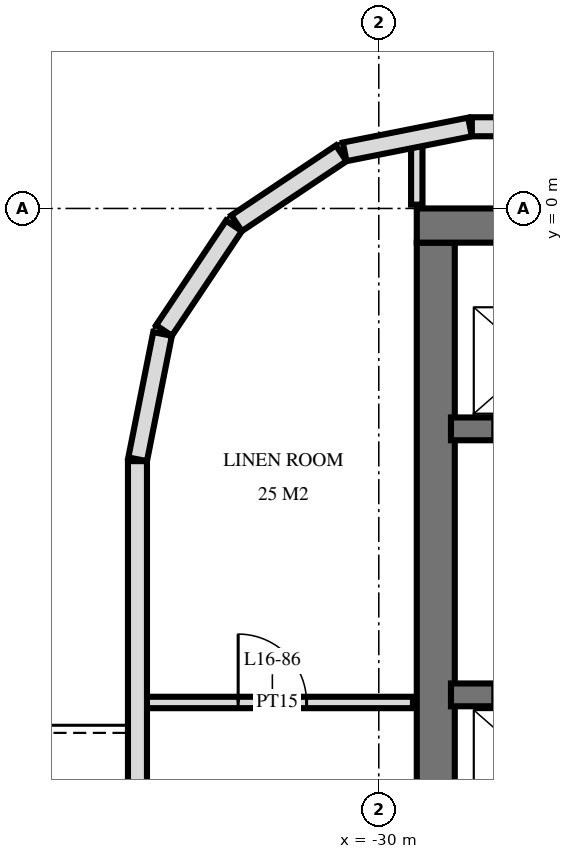
"""IFC4 building model, lengths in metres.
Left out: names, types, materials, properties, quantities, classifications, styles, units other than length and angle.
Written with IfcOpenShell. Run it as: python <this file> out.ifc"""

import sys

from ifc_helpers import new_model, si_unit, direction, frame, frame_2d, origin, place, context, subcontext, project, spatial, rectangle, extrude, element, fill, save


model = new_model("IFC4")
c1 = context("Model", 3, precision=1e-05, world=origin(), true_north=direction((0.0, 1.0)))
c2 = subcontext(c1, "Body", "Model", "MODEL_VIEW")
j1 = project(units=[si_unit("LENGTHUNIT", "METRE"), si_unit("PLANEANGLEUNIT", "RADIAN")], contexts=[c1])
p1 = place(None, origin())
s1 = spatial("IfcSite", under=j1, at=p1, CompositionType="ELEMENT")
p2 = place(p1, origin())
s2 = spatial("IfcBuilding", under=s1, at=p2, CompositionType="ELEMENT")
p3 = place(p2, frame((0.0, 0.0, 67.2)))
s3 = spatial("IfcBuildingStorey", under=s2, at=p3, CompositionType="ELEMENT", Elevation=67.2)
p4 = place(p3, frame((-29.5, -0.225, 0.0), z_axis=(0.0, 0.0, 1.0), x_axis=(1.0, 0.0, 0.0)))
e1 = element("IfcWall", 1, at=p4, inside=s3, PredefinedType="SHEAR", context=c2, shape_type="SweptSolid", body=[
    extrude(rectangle(XDim=19.5, YDim=0.45, at=frame_2d((9.75, 0.0))), origin(), (0.0, 0.0, 1.0), 3.6),
])
p5 = place(p3, frame((-29.25, -14.55, 0.0), z_axis=(0.0, 0.0, 1.0), x_axis=(0.0, 1.0, 0.0)))
e2 = element("IfcWall", 2, at=p5, inside=s3, PredefinedType="SHEAR", context=c2, shape_type="SweptSolid", body=[
    extrude(rectangle(XDim=14.1, YDim=0.5, at=frame_2d((7.05, 0.0))), origin(), (0.0, 0.0, 1.0), 3.6),
])
p6 = place(p3, frame((-29.05, -2.9, 0.0), z_axis=(0.0, 0.0, 1.0), x_axis=(1.0, 0.0, 0.0)))
e3 = element("IfcWall", 3, at=p6, inside=s3, PredefinedType="SHEAR", context=c2, shape_type="SweptSolid", body=[
    extrude(rectangle(XDim=18.7, YDim=0.3, at=frame_2d((9.35, 0.0))), origin(), (0.0, 0.0, 1.0), 3.6),
])
p7 = place(p6, frame((2.95, 0.0, 0.0)))
e4 = element("IfcOpeningElement", 4, at=p7, cuts=e3, PredefinedType="OPENING", context=c2, shape_type="SweptSolid", body=[
    extrude(rectangle(XDim=1.1, YDim=2.1, at=frame_2d((0.55, 1.05))), frame((0.0, 0.16, 0.0), z_axis=(0.0, -1.0, 0.0), x_axis=(1.0, 0.0, 0.0)), (0.0, 0.0, 1.0), 0.32),
])
p8 = place(p6, frame((0.55, 0.0, 0.0)))
e5 = element("IfcOpeningElement", 5, at=p8, cuts=e3, PredefinedType="OPENING", context=c2, shape_type="SweptSolid", body=[
    extrude(rectangle(XDim=1.1, YDim=2.1, at=frame_2d((0.55, 1.05))), frame((0.0, 0.16, 0.0), z_axis=(0.0, -1.0, 0.0), x_axis=(1.0, 0.0, 0.0)), (0.0, 0.0, 1.0), 0.32),
])
p9 = place(p6, frame((11.613, 0.0, 0.0)))
e6 = element("IfcOpeningElement", 6, at=p9, cuts=e3, PredefinedType="OPENING", context=c2, shape_type="SweptSolid", body=[
    extrude(rectangle(XDim=0.9, YDim=2.1, at=frame_2d((0.45, 1.05))), frame((0.0, 0.16, 0.0), z_axis=(0.0, -1.0, 0.0), x_axis=(1.0, 0.0, 0.0)), (0.0, 0.0, 1.0), 0.32),
])
p10 = place(p6, frame((10.188, 0.0, 0.0)))
e7 = element("IfcOpeningElement", 7, at=p10, cuts=e3, PredefinedType="OPENING", context=c2, shape_type="SweptSolid", body=[
    extrude(rectangle(XDim=0.9, YDim=2.1, at=frame_2d((0.45, 1.05))), frame((0.0, 0.16, 0.0), z_axis=(0.0, -1.0, 0.0), x_axis=(1.0, 0.0, 0.0)), (0.0, 0.0, 1.0), 0.32),
])
p11 = place(p6, frame((17.562, 0.0, 0.0)))
e8 = element("IfcOpeningElement", 8, at=p11, cuts=e3, PredefinedType="OPENING", context=c2, shape_type="SweptSolid", body=[
    extrude(rectangle(XDim=1.0, YDim=2.1, at=frame_2d((0.5, 1.05))), frame((0.0, 0.16, 0.0), z_axis=(0.0, -1.0, 0.0), x_axis=(1.0, 0.0, 0.0)), (0.0, 0.0, 1.0), 0.32),
])
p12 = place(p6, frame((16.137, 0.0, 0.0)))
e9 = element("IfcOpeningElement", 9, at=p12, cuts=e3, PredefinedType="OPENING", context=c2, shape_type="SweptSolid", body=[
    extrude(rectangle(XDim=1.0, YDim=2.1, at=frame_2d((0.5, 1.05))), frame((0.0, 0.16, 0.0), z_axis=(0.0, -1.0, 0.0), x_axis=(1.0, 0.0, 0.0)), (0.0, 0.0, 1.0), 0.32),
])
p13 = place(p6, frame((13.85, 0.0, 0.0)))
e10 = element("IfcOpeningElement", 10, at=p13, cuts=e3, PredefinedType="OPENING", context=c2, shape_type="SweptSolid", body=[
    extrude(rectangle(XDim=1.0, YDim=2.1, at=frame_2d((0.5, 1.05))), frame((0.0, 0.16, 0.0), z_axis=(0.0, -1.0, 0.0), x_axis=(1.0, 0.0, 0.0)), (0.0, 0.0, 1.0), 0.32),
])
p14 = place(p6, frame((5.6, 0.0, 0.0)))
e11 = element("IfcOpeningElement", 11, at=p14, cuts=e3, PredefinedType="OPENING", context=c2, shape_type="SweptSolid", body=[
    extrude(rectangle(XDim=1.0, YDim=2.1, at=frame_2d((0.5, 1.05))), frame((0.0, 0.16, 0.0), z_axis=(0.0, -1.0, 0.0), x_axis=(1.0, 0.0, 0.0)), (0.0, 0.0, 1.0), 0.32),
])
p15 = place(p3, frame((-29.05, -6.4, 0.0), z_axis=(0.0, 0.0, 1.0), x_axis=(1.0, 0.0, 0.0)))
e12 = element("IfcWall", 12, at=p15, inside=s3, PredefinedType="SHEAR", context=c2, shape_type="SweptSolid", body=[
    extrude(rectangle(XDim=18.7, YDim=0.3, at=frame_2d((9.35, 0.0))), origin(), (0.0, 0.0, 1.0), 3.6),
])
p16 = place(p15, frame((2.95, 0.0, 0.0)))
e13 = element("IfcOpeningElement", 13, at=p16, cuts=e12, PredefinedType="OPENING", context=c2, shape_type="SweptSolid", body=[
    extrude(rectangle(XDim=1.1, YDim=2.1, at=frame_2d((0.55, 1.05))), frame((0.0, 0.16, 0.0), z_axis=(0.0, -1.0, 0.0), x_axis=(1.0, 0.0, 0.0)), (0.0, 0.0, 1.0), 0.32),
])
p17 = place(p15, frame((0.55, 0.0, 0.0)))
e14 = element("IfcOpeningElement", 14, at=p17, cuts=e12, PredefinedType="OPENING", context=c2, shape_type="SweptSolid", body=[
    extrude(rectangle(XDim=1.1, YDim=2.1, at=frame_2d((0.55, 1.05))), frame((0.0, 0.16, 0.0), z_axis=(0.0, -1.0, 0.0), x_axis=(1.0, 0.0, 0.0)), (0.0, 0.0, 1.0), 0.32),
])
p18 = place(p15, frame((10.8, 0.0, 0.0)))
e15 = element("IfcOpeningElement", 15, at=p18, cuts=e12, PredefinedType="OPENING", context=c2, shape_type="SweptSolid", body=[
    extrude(rectangle(XDim=1.1, YDim=2.1, at=frame_2d((0.55, 1.05))), frame((0.0, 0.16, 0.0), z_axis=(0.0, -1.0, 0.0), x_axis=(1.0, 0.0, 0.0)), (0.0, 0.0, 1.0), 0.32),
])
p19 = place(p15, frame((5.6, 0.0, 0.0)))
e16 = element("IfcOpeningElement", 16, at=p19, cuts=e12, PredefinedType="OPENING", context=c2, shape_type="SweptSolid", body=[
    extrude(rectangle(XDim=1.0, YDim=2.1, at=frame_2d((0.5, 1.05))), frame((0.0, 0.16, 0.0), z_axis=(0.0, -1.0, 0.0), x_axis=(1.0, 0.0, 0.0)), (0.0, 0.0, 1.0), 0.32),
])
p20 = place(p3, frame((28.775, 1.075, 0.0), z_axis=(0.0, 0.0, 1.0), x_axis=(-1.0, 0.0, 0.0)))
e17 = element("IfcWall", 17, at=p20, inside=s3, PredefinedType="SOLIDWALL", context=c2, shape_type="SweptSolid", body=[
    extrude(rectangle(XDim=57.551, YDim=0.25, at=frame_2d((28.775, 0.0))), origin(), (0.0, 0.0, 1.0), 3.32),
])
p21 = place(p20, frame((35.575, 0.0, 0.3)))
e18 = element("IfcOpeningElement", 18, at=p21, cuts=e17, PredefinedType="OPENING", context=c2, shape_type="SweptSolid", body=[
    extrude(rectangle(XDim=2.4, YDim=2.1, at=frame_2d((1.2, 1.05))), frame((0.0, 0.135, 0.0), z_axis=(0.0, -1.0, 0.0), x_axis=(1.0, 0.0, 0.0)), (0.0, 0.0, 1.0), 0.27),
])
p22 = place(p3, frame((-28.8, 1.073, 0.0), z_axis=(0.0, 0.0, 1.0), x_axis=(-0.980803419081, -0.194999110559, 0.0)))
e19 = element("IfcWall", 19, at=p22, inside=s3, PredefinedType="SOLIDWALL", context=c2, shape_type="SweptSolid", body=[
    extrude(rectangle(XDim=1.681, YDim=0.25, at=frame_2d((0.841, 0.0))), origin(), (0.0, 0.0, 1.0), 3.32),
])
for number, where, z_axis, x_axis in (
    (20, (-30.494, 0.726, 0.0), (0.0, 0.0, 1.0), (-0.831, -0.556, 0.0)),
    (21, (-31.906, -0.229, 0.0), (0.0, 0.0, 1.0), (-0.556, -0.831, 0.0)),
):
    element("IfcWall", number, at=place(p3, frame(where, z_axis=z_axis, x_axis=x_axis)), inside=s3, PredefinedType="SOLIDWALL", context=c2, shape_type="SweptSolid", body=[
        extrude(rectangle(XDim=1.656, YDim=0.25, at=frame_2d((0.828, 0.0))), origin(), (0.0, 0.0, 1.0), 3.32),
    ])
p23 = place(p3, frame((-32.844, -1.651, 0.0), z_axis=(0.0, 0.0, 1.0), x_axis=(-0.19513878023, -0.980775640221, 0.0)))
e22 = element("IfcWall", 22, at=p23, inside=s3, PredefinedType="SOLIDWALL", context=c2, shape_type="SweptSolid", body=[
    extrude(rectangle(XDim=1.681, YDim=0.25, at=frame_2d((0.841, 0.0))), origin(), (0.0, 0.0, 1.0), 3.32),
])
p24 = place(p3, frame((-33.175, -3.325, 0.0), z_axis=(0.0, 0.0, 1.0), x_axis=(0.0, -1.0, 0.0)))
e23 = element("IfcWall", 23, at=p24, inside=s3, PredefinedType="SOLIDWALL", context=c2, shape_type="SweptSolid", body=[
    extrude(rectangle(XDim=21.551, YDim=0.25, at=frame_2d((10.775, 0.0))), origin(), (0.0, 0.0, 1.0), 3.32),
])
p25 = place(p24, frame((6.65, 0.0, 0.0)))
e24 = element("IfcOpeningElement", 24, at=p25, cuts=e23, PredefinedType="OPENING", context=c2, shape_type="SweptSolid", body=[
    extrude(rectangle(XDim=1.8, YDim=2.4, at=frame_2d((0.9, 1.2))), frame((0.0, 0.135, 0.0), z_axis=(0.0, -1.0, 0.0), x_axis=(1.0, 0.0, 0.0)), (0.0, 0.0, 1.0), 0.27),
])
p26 = place(p24, frame((12.575, 0.0, 0.3)))
e25 = element("IfcOpeningElement", 25, at=p26, cuts=e23, PredefinedType="OPENING", context=c2, shape_type="SweptSolid", body=[
    extrude(rectangle(XDim=1.2, YDim=2.1, at=frame_2d((0.6, 1.05))), frame((0.0, 0.135, 0.0), z_axis=(0.0, -1.0, 0.0), x_axis=(1.0, 0.0, 0.0)), (0.0, 0.0, 1.0), 0.27),
])
p27 = place(p24, frame((15.275, 0.0, 0.0)))
e26 = element("IfcOpeningElement", 26, at=p27, cuts=e23, PredefinedType="OPENING", context=c2, shape_type="SweptSolid", body=[
    extrude(rectangle(XDim=1.8, YDim=2.4, at=frame_2d((0.9, 1.2))), frame((0.0, 0.135, 0.0), z_axis=(0.0, -1.0, 0.0), x_axis=(1.0, 0.0, 0.0)), (0.0, 0.0, 1.0), 0.27),
])
p28 = place(p24, frame((18.875, 0.0, 0.0)))
e27 = element("IfcOpeningElement", 27, at=p28, cuts=e23, PredefinedType="OPENING", context=c2, shape_type="SweptSolid", body=[
    extrude(rectangle(XDim=1.8, YDim=2.4, at=frame_2d((0.9, 1.2))), frame((0.0, 0.135, 0.0), z_axis=(0.0, -1.0, 0.0), x_axis=(1.0, 0.0, 0.0)), (0.0, 0.0, 1.0), 0.27),
])
p29 = place(p3, frame((-29.5, 0.05, 0.0), z_axis=(0.0, 0.0, 1.0), x_axis=(0.0, 1.0, 0.0)))
e28 = element("IfcWall", 28, at=p29, inside=s3, PredefinedType="PARTITIONING", context=c2, shape_type="SweptSolid", body=[
    extrude(rectangle(XDim=0.827, YDim=0.15, at=frame_2d((0.414, 0.0))), origin(), (0.0, 0.0, 1.0), 3.32),
])
p30 = place(p3, frame((-33.12, -6.5, 0.0), z_axis=(0.0, 0.0, 1.0), x_axis=(1.0, 0.0, 0.0)))
e29 = element("IfcWall", 29, at=p30, inside=s3, PredefinedType="PARTITIONING", context=c2, shape_type="SweptSolid", body=[
    extrude(rectangle(XDim=3.57, YDim=0.15, at=frame_2d((1.785, 0.0))), origin(), (0.0, 0.0, 1.0), 3.32),
])
p31 = place(p30, frame((1.27, 0.0, 0.0)))
e30 = element("IfcOpeningElement", 30, at=p31, cuts=e29, PredefinedType="OPENING", context=c2, shape_type="SweptSolid", body=[
    extrude(rectangle(XDim=0.9, YDim=2.1, at=frame_2d((0.45, 1.05))), frame((0.0, 0.085, 0.0), z_axis=(0.0, -1.0, 0.0), x_axis=(1.0, 0.0, 0.0)), (0.0, 0.0, 1.0), 0.17),
])
p32 = place(p31, origin())
e31 = element("IfcDoor", 31, at=p32, inside=s3, OperationType="SINGLE_SWING_RIGHT", PredefinedType="DOOR", context=c2, shape_type="SweptSolid", body=[
    extrude(rectangle(XDim=0.9, YDim=2.1, at=frame_2d((0.45, 1.05))), frame((0.0, 0.025, 0.0), z_axis=(0.0, -1.0, 0.0), x_axis=(1.0, 0.0, 0.0)), (0.0, 0.0, 1.0), 0.05),
])
fill(e30, e31)
save(model, sys.argv[1])
